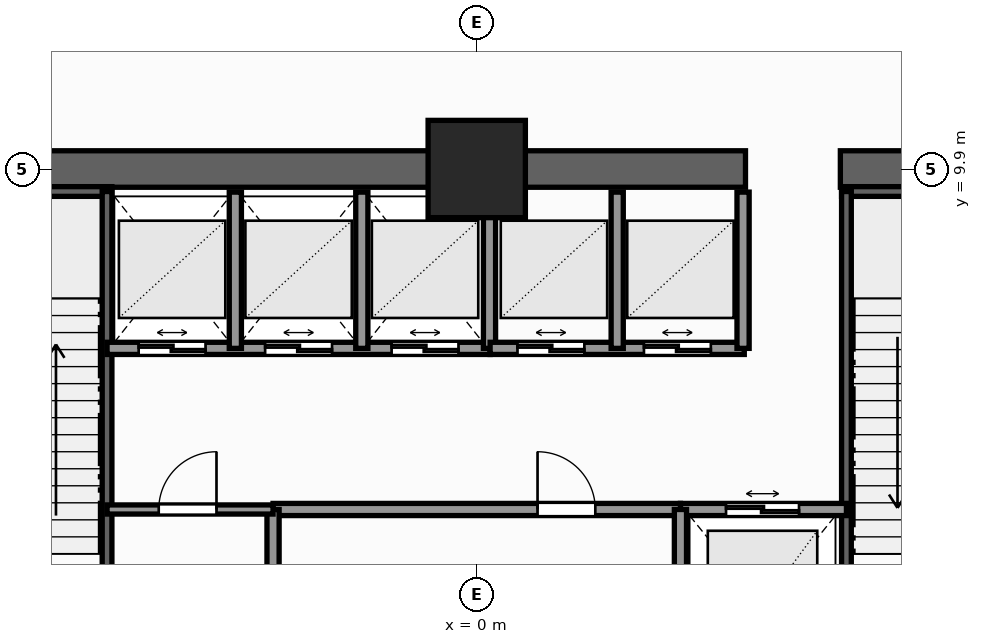
"""IFC4 building model, lengths in metres.
Left out: names, types, materials, properties, quantities, classifications, styles, units other than length and angle.
Written with IfcOpenShell. Run it as: python <this file> out.ifc"""

import sys

from ifc_helpers import new_model, si_unit, direction, frame, frame_2d, origin, origin_2d, place, context, subcontext, project, spatial, rectangle, extrude, element, fill, save


model = new_model("IFC4")
c1 = context("Model", 3, precision=1e-05, world=origin(), true_north=direction((0.0, 1.0)))
c2 = subcontext(c1, "Body", "Model", "MODEL_VIEW")
j1 = project(units=[si_unit("LENGTHUNIT", "METRE"), si_unit("PLANEANGLEUNIT", "RADIAN")], contexts=[c1])
p1 = place(None, origin())
s1 = spatial("IfcSite", under=j1, at=p1, CompositionType="ELEMENT")
p2 = place(p1, origin())
s2 = spatial("IfcBuilding", under=s1, at=p2, CompositionType="ELEMENT")
p3 = place(p2, origin())
s3 = spatial("IfcBuildingStorey", under=s2, at=p3, CompositionType="ELEMENT", Elevation=0.0)
p4 = place(p3, frame((-10.2, 9.9, 0.0), z_axis=(0.0, 0.0, 1.0), x_axis=(1.0, 0.0, 0.0)))
e1 = element("IfcWall", 1, at=p4, inside=s3, PredefinedType="SHEAR", context=c2, shape_type="SweptSolid", body=[
    extrude(rectangle(XDim=14.62, YDim=0.6, at=frame_2d((7.31, 0.0))), origin(), (0.0, 0.0, 1.0), 5.5),
])
p5 = place(p3, frame((5.98, 9.9, 0.0), z_axis=(0.0, 0.0, 1.0), x_axis=(1.0, 0.0, 0.0)))
e2 = element("IfcWall", 2, at=p5, inside=s3, PredefinedType="SHEAR", context=c2, shape_type="SweptSolid", body=[
    extrude(rectangle(XDim=4.22, YDim=0.6, at=frame_2d((2.11, 0.0))), origin(), (0.0, 0.0, 1.0), 5.5),
])
p6 = place(p3, frame((0.0, 9.9, 0.0), z_axis=(0.0, 0.0, 1.0), x_axis=(1.0, 0.0, 0.0)))
e3 = element("IfcColumn", 3, at=p6, inside=s3, PredefinedType="COLUMN", context=c2, shape_type="SweptSolid", body=[
    extrude(rectangle(XDim=1.6, YDim=1.6, at=origin_2d()), origin(), (0.0, 0.0, 1.0), 5.5),
])
p7 = place(p3, frame((-9.52, 9.53, 0.0), z_axis=(0.0, 0.0, 1.0), x_axis=(1.0, 0.0, 0.0)))
e4 = element("IfcWall", 4, at=p7, inside=s3, PredefinedType="SHEAR", context=c2, shape_type="SweptSolid", body=[
    extrude(rectangle(XDim=3.52, YDim=0.16, at=frame_2d((1.76, 0.0))), origin(), (0.0, 0.0, 1.0), 5.5),
])
p8 = place(p3, frame((-6.08, 1.97, 0.0), z_axis=(0.0, 0.0, 1.0), x_axis=(0.0, 1.0, 0.0)))
e5 = element("IfcWall", 5, at=p8, inside=s3, PredefinedType="SHEAR", context=c2, shape_type="SweptSolid", body=[
    extrude(rectangle(XDim=7.56, YDim=0.16, at=frame_2d((3.78, 0.0))), origin(), (0.0, 0.0, 1.0), 5.5),
])
p9 = place(p3, frame((6.0, 9.53, 0.0), z_axis=(0.0, 0.0, 1.0), x_axis=(1.0, 0.0, 0.0)))
e6 = element("IfcWall", 6, at=p9, inside=s3, PredefinedType="SHEAR", context=c2, shape_type="SweptSolid", body=[
    extrude(rectangle(XDim=3.52, YDim=0.16, at=frame_2d((1.76, 0.0))), origin(), (0.0, 0.0, 1.0), 5.5),
])
p10 = place(p3, frame((6.08, 1.97, 0.0), z_axis=(0.0, 0.0, 1.0), x_axis=(0.0, 1.0, 0.0)))
e7 = element("IfcWall", 7, at=p10, inside=s3, PredefinedType="SHEAR", context=c2, shape_type="SweptSolid", body=[
    extrude(rectangle(XDim=7.56, YDim=0.16, at=frame_2d((3.78, 0.0))), origin(), (0.0, 0.0, 1.0), 5.5),
])
p11 = place(p3, frame((3.35, 4.3, 0.0), z_axis=(0.0, 0.0, 1.0), x_axis=(1.0, 0.0, 0.0)))
e8 = element("IfcWall", 8, at=p11, inside=s3, PredefinedType="SOLIDWALL", context=c2, shape_type="SweptSolid", body=[
    extrude(rectangle(XDim=2.73, YDim=0.2, at=frame_2d((1.365, 0.0))), origin(), (0.0, 0.0, 1.0), 5.22),
])
p12 = place(p11, frame((0.75, 0.0, 0.0)))
e9 = element("IfcOpeningElement", 9, at=p12, cuts=e8, PredefinedType="OPENING", context=c2, shape_type="SweptSolid", body=[
    extrude(rectangle(XDim=1.2, YDim=2.25, at=frame_2d((0.6, 1.125))), frame((0.0, 0.11, 0.0), z_axis=(0.0, -1.0, 0.0), x_axis=(1.0, 0.0, 0.0)), (0.0, 0.0, 1.0), 0.22),
])
p13 = place(p3, frame((-6.08, 6.95, 0.0), z_axis=(0.0, 0.0, 1.0), x_axis=(1.0, 0.0, 0.0)))
e10 = element("IfcWall", 10, at=p13, inside=s3, PredefinedType="SOLIDWALL", context=c2, shape_type="SweptSolid", body=[
    extrude(rectangle(XDim=6.3, YDim=0.2, at=frame_2d((3.15, 0.0))), origin(), (0.0, 0.0, 1.0), 5.22),
])
p14 = place(p13, frame((0.52, 0.0, 0.0)))
e11 = element("IfcOpeningElement", 11, at=p14, cuts=e10, PredefinedType="OPENING", context=c2, shape_type="SweptSolid", body=[
    extrude(rectangle(XDim=1.1, YDim=2.2, at=frame_2d((0.55, 1.1))), frame((0.0, 0.11, 0.0), z_axis=(0.0, -1.0, 0.0), x_axis=(1.0, 0.0, 0.0)), (0.0, 0.0, 1.0), 0.22),
])
p15 = place(p13, frame((2.6, 0.0, 0.0)))
e12 = element("IfcOpeningElement", 12, at=p15, cuts=e10, PredefinedType="OPENING", context=c2, shape_type="SweptSolid", body=[
    extrude(rectangle(XDim=1.1, YDim=2.2, at=frame_2d((0.55, 1.1))), frame((0.0, 0.11, 0.0), z_axis=(0.0, -1.0, 0.0), x_axis=(1.0, 0.0, 0.0)), (0.0, 0.0, 1.0), 0.22),
])
p16 = place(p13, frame((4.68, 0.0, 0.0)))
e13 = element("IfcOpeningElement", 13, at=p16, cuts=e10, PredefinedType="OPENING", context=c2, shape_type="SweptSolid", body=[
    extrude(rectangle(XDim=1.1, YDim=2.2, at=frame_2d((0.55, 1.1))), frame((0.0, 0.11, 0.0), z_axis=(0.0, -1.0, 0.0), x_axis=(1.0, 0.0, 0.0)), (0.0, 0.0, 1.0), 0.22),
])
for number, where, z_axis, x_axis in (
    (14, (-3.97, 6.95, 0.0), (0.0, 0.0, 1.0), (0.0, 1.0, 0.0)),
    (15, (-1.89, 6.95, 0.0), (0.0, 0.0, 1.0), (0.0, 1.0, 0.0)),
    (16, (0.21, 6.95, 0.0), (0.0, 0.0, 1.0), (0.0, 1.0, 0.0)),
):
    element("IfcWall", number, at=place(p3, frame(where, z_axis=z_axis, x_axis=x_axis)), inside=s3, PredefinedType="SOLIDWALL", context=c2, shape_type="SweptSolid", body=[
        extrude(rectangle(XDim=2.57, YDim=0.2, at=frame_2d((1.285, 0.0))), origin(), (0.0, 0.0, 1.0), 5.22),
    ])
p17 = place(p3, frame((0.22, 6.95, 0.0), z_axis=(0.0, 0.0, 1.0), x_axis=(1.0, 0.0, 0.0)))
e17 = element("IfcWall", 17, at=p17, inside=s3, PredefinedType="SOLIDWALL", context=c2, shape_type="SweptSolid", body=[
    extrude(rectangle(XDim=4.18, YDim=0.2, at=frame_2d((2.09, 0.0))), origin(), (0.0, 0.0, 1.0), 5.22),
])
p18 = place(p17, frame((0.45, 0.0, 0.0)))
e18 = element("IfcOpeningElement", 18, at=p18, cuts=e17, PredefinedType="OPENING", context=c2, shape_type="SweptSolid", body=[
    extrude(rectangle(XDim=1.1, YDim=2.2, at=frame_2d((0.55, 1.1))), frame((0.0, 0.11, 0.0), z_axis=(0.0, -1.0, 0.0), x_axis=(1.0, 0.0, 0.0)), (0.0, 0.0, 1.0), 0.22),
])
p19 = place(p17, frame((2.53, 0.0, 0.0)))
e19 = element("IfcOpeningElement", 19, at=p19, cuts=e17, PredefinedType="OPENING", context=c2, shape_type="SweptSolid", body=[
    extrude(rectangle(XDim=1.1, YDim=2.2, at=frame_2d((0.55, 1.1))), frame((0.0, 0.11, 0.0), z_axis=(0.0, -1.0, 0.0), x_axis=(1.0, 0.0, 0.0)), (0.0, 0.0, 1.0), 0.22),
])
for number, where, z_axis, x_axis in (
    (20, (4.38, 6.95, 0.0), (0.0, 0.0, 1.0), (0.0, 1.0, 0.0)),
    (21, (2.31, 6.95, 0.0), (0.0, 0.0, 1.0), (0.0, 1.0, 0.0)),
):
    element("IfcWall", number, at=place(p3, frame(where, z_axis=z_axis, x_axis=x_axis)), inside=s3, PredefinedType="SOLIDWALL", context=c2, shape_type="SweptSolid", body=[
        extrude(rectangle(XDim=2.57, YDim=0.2, at=frame_2d((1.285, 0.0))), origin(), (0.0, 0.0, 1.0), 5.22),
    ])
p20 = place(p3, frame((-3.35, 4.3, 0.0), z_axis=(0.0, 0.0, 1.0), x_axis=(1.0, 0.0, 0.0)))
e22 = element("IfcWall", 22, at=p20, inside=s3, PredefinedType="SOLIDWALL", context=c2, shape_type="SweptSolid", body=[
    extrude(rectangle(XDim=6.7, YDim=0.2, at=frame_2d((3.35, 0.0))), origin(), (0.0, 0.0, 1.0), 5.22),
])
p21 = place(p20, frame((4.35, 0.0, 0.0)))
e23 = element("IfcOpeningElement", 23, at=p21, cuts=e22, PredefinedType="OPENING", context=c2, shape_type="SweptSolid", body=[
    extrude(rectangle(XDim=0.95, YDim=2.06, at=frame_2d((0.475, 1.03))), frame((0.0, 0.11, 0.0), z_axis=(0.0, -1.0, 0.0), x_axis=(1.0, 0.0, 0.0)), (0.0, 0.0, 1.0), 0.22),
])
for number, where, z_axis, x_axis in (
    (24, (-3.35, 1.1, 0.0), (0.0, 0.0, 1.0), (0.0, 1.0, 0.0)),
    (25, (3.35, 1.1, 0.0), (0.0, 0.0, 1.0), (0.0, 1.0, 0.0)),
):
    element("IfcWall", number, at=place(p3, frame(where, z_axis=z_axis, x_axis=x_axis)), inside=s3, PredefinedType="SOLIDWALL", context=c2, shape_type="SweptSolid", body=[
        extrude(rectangle(XDim=3.2, YDim=0.2, at=frame_2d((1.6, 0.0))), origin(), (0.0, 0.0, 1.0), 5.22),
    ])
p22 = place(p3, frame((-6.08, 4.3, 0.0), z_axis=(0.0, 0.0, 1.0), x_axis=(1.0, 0.0, 0.0)))
e26 = element("IfcWall", 26, at=p22, inside=s3, PredefinedType="PARTITIONING", context=c2, shape_type="SweptSolid", body=[
    extrude(rectangle(XDim=2.73, YDim=0.15, at=frame_2d((1.365, 0.0))), origin(), (0.0, 0.0, 1.0), 5.22),
])
p23 = place(p22, frame((0.85, 0.0, 0.0)))
e27 = element("IfcOpeningElement", 27, at=p23, cuts=e26, PredefinedType="OPENING", context=c2, shape_type="SweptSolid", body=[
    extrude(rectangle(XDim=0.95, YDim=2.06, at=frame_2d((0.475, 1.03))), frame((0.0, 0.085, 0.0), z_axis=(0.0, -1.0, 0.0), x_axis=(1.0, 0.0, 0.0)), (0.0, 0.0, 1.0), 0.17),
])
p24 = place(p12, origin())
e28 = element("IfcDoor", 28, at=p24, inside=s3, OperationType="DOUBLE_DOOR_SLIDING", PredefinedType="DOOR", context=c2, shape_type="SweptSolid", body=[
    extrude(rectangle(XDim=1.2, YDim=2.25, at=frame_2d((0.6, 1.125))), frame((0.0, 0.025, 0.0), z_axis=(0.0, -1.0, 0.0), x_axis=(1.0, 0.0, 0.0)), (0.0, 0.0, 1.0), 0.05),
])
fill(e9, e28)
p25 = place(p14, origin())
e29 = element("IfcDoor", 29, at=p25, inside=s3, OperationType="DOUBLE_DOOR_SLIDING", PredefinedType="DOOR", context=c2, shape_type="SweptSolid", body=[
    extrude(rectangle(XDim=1.1, YDim=2.2, at=frame_2d((0.55, 1.1))), frame((0.0, 0.025, 0.0), z_axis=(0.0, -1.0, 0.0), x_axis=(1.0, 0.0, 0.0)), (0.0, 0.0, 1.0), 0.05),
])
fill(e11, e29)
p26 = place(p15, origin())
e30 = element("IfcDoor", 30, at=p26, inside=s3, OperationType="DOUBLE_DOOR_SLIDING", PredefinedType="DOOR", context=c2, shape_type="SweptSolid", body=[
    extrude(rectangle(XDim=1.1, YDim=2.2, at=frame_2d((0.55, 1.1))), frame((0.0, 0.025, 0.0), z_axis=(0.0, -1.0, 0.0), x_axis=(1.0, 0.0, 0.0)), (0.0, 0.0, 1.0), 0.05),
])
fill(e12, e30)
p27 = place(p16, origin())
e31 = element("IfcDoor", 31, at=p27, inside=s3, OperationType="DOUBLE_DOOR_SLIDING", PredefinedType="DOOR", context=c2, shape_type="SweptSolid", body=[
    extrude(rectangle(XDim=1.1, YDim=2.2, at=frame_2d((0.55, 1.1))), frame((0.0, 0.025, 0.0), z_axis=(0.0, -1.0, 0.0), x_axis=(1.0, 0.0, 0.0)), (0.0, 0.0, 1.0), 0.05),
])
fill(e13, e31)
p28 = place(p18, origin())
e32 = element("IfcDoor", 32, at=p28, inside=s3, OperationType="DOUBLE_DOOR_SLIDING", PredefinedType="DOOR", context=c2, shape_type="SweptSolid", body=[
    extrude(rectangle(XDim=1.1, YDim=2.2, at=frame_2d((0.55, 1.1))), frame((0.0, 0.025, 0.0), z_axis=(0.0, -1.0, 0.0), x_axis=(1.0, 0.0, 0.0)), (0.0, 0.0, 1.0), 0.05),
])
fill(e18, e32)
p29 = place(p19, origin())
e33 = element("IfcDoor", 33, at=p29, inside=s3, OperationType="DOUBLE_DOOR_SLIDING", PredefinedType="DOOR", context=c2, shape_type="SweptSolid", body=[
    extrude(rectangle(XDim=1.1, YDim=2.2, at=frame_2d((0.55, 1.1))), frame((0.0, 0.025, 0.0), z_axis=(0.0, -1.0, 0.0), x_axis=(1.0, 0.0, 0.0)), (0.0, 0.0, 1.0), 0.05),
])
fill(e19, e33)
p30 = place(p21, origin())
e34 = element("IfcDoor", 34, at=p30, inside=s3, OperationType="SINGLE_SWING_LEFT", PredefinedType="DOOR", context=c2, shape_type="SweptSolid", body=[
    extrude(rectangle(XDim=0.95, YDim=2.06, at=frame_2d((0.475, 1.03))), frame((0.0, 0.025, 0.0), z_axis=(0.0, -1.0, 0.0), x_axis=(1.0, 0.0, 0.0)), (0.0, 0.0, 1.0), 0.05),
])
fill(e23, e34)
p31 = place(p23, origin())
e35 = element("IfcDoor", 35, at=p31, inside=s3, OperationType="SINGLE_SWING_RIGHT", PredefinedType="DOOR", context=c2, shape_type="SweptSolid", body=[
    extrude(rectangle(XDim=0.95, YDim=2.06, at=frame_2d((0.475, 1.03))), frame((0.0, 0.025, 0.0), z_axis=(0.0, -1.0, 0.0), x_axis=(1.0, 0.0, 0.0)), (0.0, 0.0, 1.0), 0.05),
])
fill(e27, e35)
save(model, sys.argv[1])
